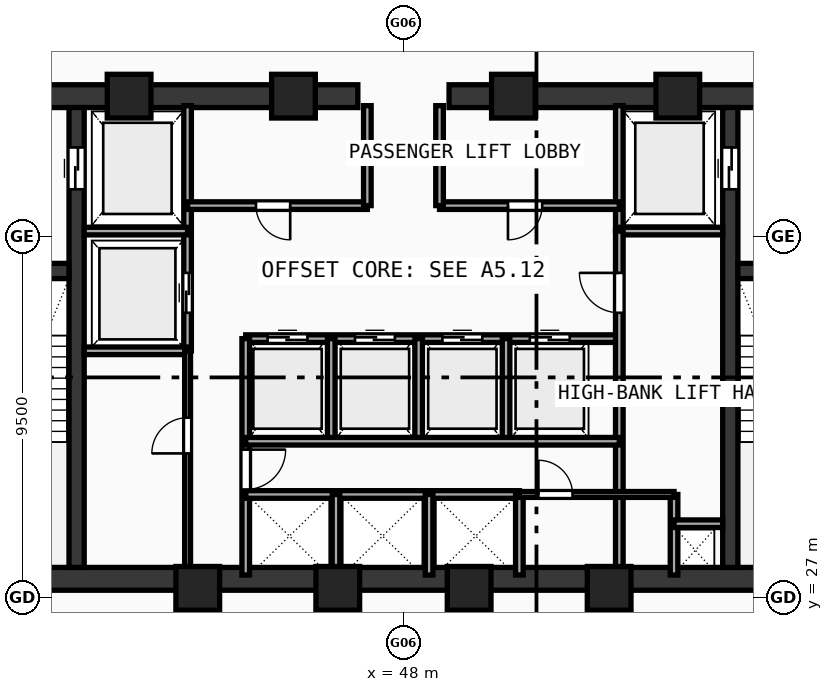
"""IFC4 building model, lengths in metres.
Left out: names, types, materials, properties, quantities, classifications, styles, units other than length and angle.
Written with IfcOpenShell. Run it as: python <this file> out.ifc"""

import sys

from ifc_helpers import new_model, si_unit, direction, frame, frame_2d, origin, origin_with_axes, origin_2d, place, context, subcontext, project, spatial, rectangle, hollow_rectangle, extrude, source, transform, mapped, element, fill, save


model = new_model("IFC4")
c1 = context("Model", 3, precision=1e-05, world=origin(), true_north=direction((0.0, 1.0)))
c2 = subcontext(c1, "Body", "Model", "MODEL_VIEW")
j1 = project(units=[si_unit("LENGTHUNIT", "METRE"), si_unit("PLANEANGLEUNIT", "RADIAN")], contexts=[c1])
p1 = place(None, origin())
s1 = spatial("IfcSite", under=j1, at=p1, CompositionType="ELEMENT")
p2 = place(p1, origin())
s2 = spatial("IfcBuilding", under=s1, at=p2, CompositionType="ELEMENT")
p3 = place(p2, frame((0.0, 0.0, 162.95)))
s3 = spatial("IfcBuildingStorey", under=s2, at=p3, CompositionType="ELEMENT", Elevation=162.95)
p4 = place(p3, frame((35.5, 27.5, 0.0), z_axis=(0.0, 0.0, 1.0), x_axis=(1.0, 0.0, 0.0)))
e1 = element("IfcWall", 1, at=p4, inside=s3, PredefinedType="SHEAR", context=c2, shape_type="SweptSolid", body=[
    extrude(rectangle(XDim=25.0, YDim=0.6, at=frame_2d((12.5, 0.0))), origin(), (0.0, 0.0, 1.0), 3.42),
])
p5 = place(p3, frame((35.5, 40.2, 0.0), z_axis=(0.0, 0.0, 1.0), x_axis=(1.0, 0.0, 0.0)))
e2 = element("IfcWall", 2, at=p5, inside=s3, PredefinedType="SHEAR", context=c2, shape_type="SweptSolid", body=[
    extrude(rectangle(XDim=11.3, YDim=0.6, at=frame_2d((5.65, 0.0))), origin(), (0.0, 0.0, 1.0), 3.42),
])
p6 = place(p5, frame((1.65, 0.0, 0.0)))
e3 = element("IfcOpeningElement", 3, at=p6, cuts=e2, PredefinedType="OPENING", context=c2, shape_type="SweptSolid", body=[
    extrude(rectangle(XDim=1.05, YDim=2.1, at=frame_2d((0.525, 1.05))), frame((0.0, 0.31, 0.0), z_axis=(0.0, -1.0, 0.0), x_axis=(1.0, 0.0, 0.0)), (0.0, 0.0, 1.0), 0.62),
])
p7 = place(p3, frame((49.2, 40.2, 0.0), z_axis=(0.0, 0.0, 1.0), x_axis=(1.0, 0.0, 0.0)))
e4 = element("IfcWall", 4, at=p7, inside=s3, PredefinedType="SHEAR", context=c2, shape_type="SweptSolid", body=[
    extrude(rectangle(XDim=11.3, YDim=0.6, at=frame_2d((5.65, 0.0))), origin(), (0.0, 0.0, 1.0), 3.42),
])
p8 = place(p7, frame((8.6, 0.0, 0.0)))
e5 = element("IfcOpeningElement", 5, at=p8, cuts=e4, PredefinedType="OPENING", context=c2, shape_type="SweptSolid", body=[
    extrude(rectangle(XDim=1.05, YDim=2.1, at=frame_2d((0.525, 1.05))), frame((0.0, 0.31, 0.0), z_axis=(0.0, -1.0, 0.0), x_axis=(1.0, 0.0, 0.0)), (0.0, 0.0, 1.0), 0.62),
])
p9 = place(p3, frame((39.4, 27.8, 0.0), z_axis=(0.0, 0.0, 1.0), x_axis=(0.0, 1.0, 0.0)))
e6 = element("IfcWall", 6, at=p9, inside=s3, PredefinedType="SHEAR", context=c2, shape_type="SweptSolid", body=[
    extrude(rectangle(XDim=12.1, YDim=0.4, at=frame_2d((6.05, 0.0))), origin(), (0.0, 0.0, 1.0), 3.42),
])
p10 = place(p9, frame((9.95, 0.0, 0.0)))
e7 = element("IfcOpeningElement", 7, at=p10, cuts=e6, PredefinedType="OPENING", context=c2, shape_type="SweptSolid", body=[
    extrude(rectangle(XDim=1.1, YDim=2.1, at=frame_2d((0.55, 1.05))), frame((0.0, 0.21, 0.0), z_axis=(0.0, -1.0, 0.0), x_axis=(1.0, 0.0, 0.0)), (0.0, 0.0, 1.0), 0.42),
])
p11 = place(p3, frame((56.6, 27.8, 0.0), z_axis=(0.0, 0.0, 1.0), x_axis=(0.0, 1.0, 0.0)))
e8 = element("IfcWall", 8, at=p11, inside=s3, PredefinedType="SHEAR", context=c2, shape_type="SweptSolid", body=[
    extrude(rectangle(XDim=12.1, YDim=0.4, at=frame_2d((6.05, 0.0))), origin(), (0.0, 0.0, 1.0), 3.42),
])
p12 = place(p11, frame((9.95, 0.0, 0.0)))
e9 = element("IfcOpeningElement", 9, at=p12, cuts=e8, PredefinedType="OPENING", context=c2, shape_type="SweptSolid", body=[
    extrude(rectangle(XDim=1.1, YDim=2.1, at=frame_2d((0.55, 1.05))), frame((0.0, 0.21, 0.0), z_axis=(0.0, -1.0, 0.0), x_axis=(1.0, 0.0, 0.0)), (0.0, 0.0, 1.0), 0.42),
])
p13 = place(p3, frame((36.1, 35.6, 0.0), z_axis=(0.0, 0.0, 1.0), x_axis=(1.0, 0.0, 0.0)))
e10 = element("IfcWall", 10, at=p13, inside=s3, PredefinedType="SHEAR", context=c2, shape_type="SweptSolid", body=[
    extrude(rectangle(XDim=3.1, YDim=0.4, at=frame_2d((1.55, 0.0))), origin(), (0.0, 0.0, 1.0), 3.42),
])
p14 = place(p13, frame((1.02, 0.0, 0.0)))
e11 = element("IfcOpeningElement", 11, at=p14, cuts=e10, PredefinedType="OPENING", context=c2, shape_type="SweptSolid", body=[
    extrude(rectangle(XDim=1.05, YDim=2.1, at=frame_2d((0.525, 1.05))), frame((0.0, 0.21, 0.0), z_axis=(0.0, -1.0, 0.0), x_axis=(1.0, 0.0, 0.0)), (0.0, 0.0, 1.0), 0.42),
])
p15 = place(p3, frame((56.8, 35.6, 0.0), z_axis=(0.0, 0.0, 1.0), x_axis=(1.0, 0.0, 0.0)))
e12 = element("IfcWall", 12, at=p15, inside=s3, PredefinedType="SHEAR", context=c2, shape_type="SweptSolid", body=[
    extrude(rectangle(XDim=3.1, YDim=0.4, at=frame_2d((1.55, 0.0))), origin(), (0.0, 0.0, 1.0), 3.42),
])
p16 = place(p15, frame((1.02, 0.0, 0.0)))
e13 = element("IfcOpeningElement", 13, at=p16, cuts=e12, PredefinedType="OPENING", context=c2, shape_type="SweptSolid", body=[
    extrude(rectangle(XDim=1.05, YDim=2.1, at=frame_2d((0.525, 1.05))), frame((0.0, 0.21, 0.0), z_axis=(0.0, -1.0, 0.0), x_axis=(1.0, 0.0, 0.0)), (0.0, 0.0, 1.0), 0.42),
])
m1 = source(origin(), c2, "Body", "SweptSolid", [
    extrude(hollow_rectangle(XDim=1.15, YDim=1.15, WallThickness=0.048, at=origin_2d()), origin(), (0.0, 0.0, 1.0), 3.68),
])
for number, where, z_axis, x_axis in (
    (14, (42.588, 27.25, -0.26), (0.0, 0.0, 1.0), (1.0, 0.0, 0.0)),
    (15, (46.272, 27.25, -0.26), (0.0, 0.0, 1.0), (1.0, 0.0, 0.0)),
    (16, (49.729, 27.25, -0.26), (0.0, 0.0, 1.0), (1.0, 0.0, 0.0)),
    (17, (53.412, 27.25, -0.26), (0.0, 0.0, 1.0), (1.0, 0.0, 0.0)),
    (18, (55.219, 40.2, -0.26), (0.0, 0.0, 1.0), (1.0, 0.0, 0.0)),
    (19, (50.894, 40.2, -0.26), (0.0, 0.0, 1.0), (1.0, 0.0, 0.0)),
    (20, (45.106, 40.2, -0.26), (0.0, 0.0, 1.0), (1.0, 0.0, 0.0)),
    (21, (40.781, 40.2, -0.26), (0.0, 0.0, 1.0), (1.0, 0.0, 0.0)),
):
    element("IfcColumn", number, at=place(p3, frame(where, z_axis=z_axis, x_axis=x_axis)), inside=s3, PredefinedType="COLUMN", context=c2, shape_type="MappedRepresentation", body=[
        mapped(m1, transform((0.0, 0.0, 0.0), scale=1.0)),
    ])
p17 = place(p3, frame((42.32, 33.5, 0.0), z_axis=(0.0, 0.0, 1.0), x_axis=(0.0, 1.0, 0.0)))
e22 = element("IfcWall", 22, at=p17, inside=s3, PredefinedType="SOLIDWALL", context=c2, shape_type="SweptSolid", body=[
    extrude(rectangle(XDim=6.45, YDim=0.2, at=frame_2d((3.225, 0.0))), origin(), (0.0, 0.0, 1.0), 3.42),
])
p18 = place(p17, frame((1.0, 0.0, 0.0)))
e23 = element("IfcOpeningElement", 23, at=p18, cuts=e22, PredefinedType="OPENING", context=c2, shape_type="SweptSolid", body=[
    extrude(rectangle(XDim=1.05, YDim=2.1, at=frame_2d((0.525, 1.05))), frame((0.0, 0.11, 0.0), z_axis=(0.0, -1.0, 0.0), x_axis=(1.0, 0.0, 0.0)), (0.0, 0.0, 1.0), 0.22),
])
for number, where, z_axis, x_axis in (
    (24, (39.6, 36.65, 0.0), (0.0, 0.0, 1.0), (1.0, 0.0, 0.0)),
    (25, (39.6, 33.5, 0.0), (0.0, 0.0, 1.0), (1.0, 0.0, 0.0)),
):
    element("IfcWall", number, at=place(p3, frame(where, z_axis=z_axis, x_axis=x_axis)), inside=s3, PredefinedType="SOLIDWALL", context=c2, shape_type="SweptSolid", body=[
        extrude(rectangle(XDim=2.72, YDim=0.2, at=frame_2d((1.36, 0.0))), origin(), (0.0, 0.0, 1.0), 3.42),
    ])
p19 = place(p3, frame((53.68, 36.65, 0.0), z_axis=(0.0, 0.0, 1.0), x_axis=(0.0, 1.0, 0.0)))
e26 = element("IfcWall", 26, at=p19, inside=s3, PredefinedType="SOLIDWALL", context=c2, shape_type="SweptSolid", body=[
    extrude(rectangle(XDim=3.3, YDim=0.2, at=frame_2d((1.65, 0.0))), origin(), (0.0, 0.0, 1.0), 3.42),
])
p20 = place(p3, frame((53.68, 36.65, 0.0), z_axis=(0.0, 0.0, 1.0), x_axis=(1.0, 0.0, 0.0)))
e27 = element("IfcWall", 27, at=p20, inside=s3, PredefinedType="SOLIDWALL", context=c2, shape_type="SweptSolid", body=[
    extrude(rectangle(XDim=2.72, YDim=0.2, at=frame_2d((1.36, 0.0))), origin(), (0.0, 0.0, 1.0), 3.42),
])
p21 = place(p3, frame((42.32, 37.32, 0.0), z_axis=(0.0, 0.0, 1.0), x_axis=(1.0, 0.0, 0.0)))
e28 = element("IfcWall", 28, at=p21, inside=s3, PredefinedType="SOLIDWALL", context=c2, shape_type="SweptSolid", body=[
    extrude(rectangle(XDim=4.73, YDim=0.2, at=frame_2d((2.365, 0.0))), origin(), (0.0, 0.0, 1.0), 3.42),
])
p22 = place(p21, frame((1.8, 0.0, 0.0)))
e29 = element("IfcOpeningElement", 29, at=p22, cuts=e28, PredefinedType="OPENING", context=c2, shape_type="SweptSolid", body=[
    extrude(rectangle(XDim=0.9, YDim=2.1, at=frame_2d((0.45, 1.05))), frame((0.0, 0.11, 0.0), z_axis=(0.0, -1.0, 0.0), x_axis=(1.0, 0.0, 0.0)), (0.0, 0.0, 1.0), 0.22),
])
p23 = place(p3, frame((48.95, 37.32, 0.0), z_axis=(0.0, 0.0, 1.0), x_axis=(1.0, 0.0, 0.0)))
e30 = element("IfcWall", 30, at=p23, inside=s3, PredefinedType="SOLIDWALL", context=c2, shape_type="SweptSolid", body=[
    extrude(rectangle(XDim=4.73, YDim=0.2, at=frame_2d((2.365, 0.0))), origin(), (0.0, 0.0, 1.0), 3.42),
])
p24 = place(p23, frame((1.8, 0.0, 0.0)))
e31 = element("IfcOpeningElement", 31, at=p24, cuts=e30, PredefinedType="OPENING", context=c2, shape_type="SweptSolid", body=[
    extrude(rectangle(XDim=0.9, YDim=2.1, at=frame_2d((0.45, 1.05))), frame((0.0, 0.11, 0.0), z_axis=(0.0, -1.0, 0.0), x_axis=(1.0, 0.0, 0.0)), (0.0, 0.0, 1.0), 0.22),
])
for number, where, z_axis, x_axis in (
    (32, (47.05, 37.32, 0.0), (0.0, 0.0, 1.0), (0.0, 1.0, 0.0)),
    (33, (48.95, 37.32, 0.0), (0.0, 0.0, 1.0), (0.0, 1.0, 0.0)),
):
    element("IfcWall", number, at=place(p3, frame(where, z_axis=z_axis, x_axis=x_axis)), inside=s3, PredefinedType="SOLIDWALL", context=c2, shape_type="SweptSolid", body=[
        extrude(rectangle(XDim=2.63, YDim=0.2, at=frame_2d((1.315, 0.0))), origin(), (0.0, 0.0, 1.0), 3.42),
    ])
p25 = place(p3, frame((43.85, 33.82, 0.0), z_axis=(0.0, 0.0, 1.0), x_axis=(1.0, 0.0, 0.0)))
e34 = element("IfcWall", 34, at=p25, inside=s3, PredefinedType="SOLIDWALL", context=c2, shape_type="SweptSolid", body=[
    extrude(rectangle(XDim=9.83, YDim=0.2, at=frame_2d((4.915, 0.0))), origin(), (0.0, 0.0, 1.0), 3.42),
])
p26 = place(p25, frame((0.575, 0.0, 0.0)))
e35 = element("IfcOpeningElement", 35, at=p26, cuts=e34, PredefinedType="OPENING", context=c2, shape_type="SweptSolid", body=[
    extrude(rectangle(XDim=1.05, YDim=2.1, at=frame_2d((0.525, 1.05))), frame((0.0, 0.11, 0.0), z_axis=(0.0, -1.0, 0.0), x_axis=(1.0, 0.0, 0.0)), (0.0, 0.0, 1.0), 0.22),
])
p27 = place(p25, frame((2.875, 0.0, 0.0)))
e36 = element("IfcOpeningElement", 36, at=p27, cuts=e34, PredefinedType="OPENING", context=c2, shape_type="SweptSolid", body=[
    extrude(rectangle(XDim=1.05, YDim=2.1, at=frame_2d((0.525, 1.05))), frame((0.0, 0.11, 0.0), z_axis=(0.0, -1.0, 0.0), x_axis=(1.0, 0.0, 0.0)), (0.0, 0.0, 1.0), 0.22),
])
p28 = place(p25, frame((5.175, 0.0, 0.0)))
e37 = element("IfcOpeningElement", 37, at=p28, cuts=e34, PredefinedType="OPENING", context=c2, shape_type="SweptSolid", body=[
    extrude(rectangle(XDim=1.05, YDim=2.1, at=frame_2d((0.525, 1.05))), frame((0.0, 0.11, 0.0), z_axis=(0.0, -1.0, 0.0), x_axis=(1.0, 0.0, 0.0)), (0.0, 0.0, 1.0), 0.22),
])
p29 = place(p25, frame((7.475, 0.0, 0.0)))
e38 = element("IfcOpeningElement", 38, at=p29, cuts=e34, PredefinedType="OPENING", context=c2, shape_type="SweptSolid", body=[
    extrude(rectangle(XDim=1.05, YDim=2.1, at=frame_2d((0.525, 1.05))), frame((0.0, 0.11, 0.0), z_axis=(0.0, -1.0, 0.0), x_axis=(1.0, 0.0, 0.0)), (0.0, 0.0, 1.0), 0.22),
])
p30 = place(p3, frame((43.85, 27.6, 0.0), z_axis=(0.0, 0.0, 1.0), x_axis=(0.0, 1.0, 0.0)))
e39 = element("IfcWall", 39, at=p30, inside=s3, PredefinedType="SOLIDWALL", context=c2, shape_type="SweptSolid", body=[
    extrude(rectangle(XDim=6.22, YDim=0.2, at=frame_2d((3.11, 0.0))), origin(), (0.0, 0.0, 1.0), 3.42),
])
p31 = place(p30, frame((2.25, 0.0, 0.0)))
e40 = element("IfcOpeningElement", 40, at=p31, cuts=e39, PredefinedType="OPENING", context=c2, shape_type="SweptSolid", body=[
    extrude(rectangle(XDim=1.05, YDim=2.1, at=frame_2d((0.525, 1.05))), frame((0.0, 0.11, 0.0), z_axis=(0.0, -1.0, 0.0), x_axis=(1.0, 0.0, 0.0)), (0.0, 0.0, 1.0), 0.22),
])
p32 = place(p3, frame((53.68, 27.6, 0.0), z_axis=(0.0, 0.0, 1.0), x_axis=(0.0, 1.0, 0.0)))
e41 = element("IfcWall", 41, at=p32, inside=s3, PredefinedType="SOLIDWALL", context=c2, shape_type="SweptSolid", body=[
    extrude(rectangle(XDim=9.05, YDim=0.2, at=frame_2d((4.525, 0.0))), origin(), (0.0, 0.0, 1.0), 3.42),
])
p33 = place(p32, frame((6.9, 0.0, 0.0)))
e42 = element("IfcOpeningElement", 42, at=p33, cuts=e41, PredefinedType="OPENING", context=c2, shape_type="SweptSolid", body=[
    extrude(rectangle(XDim=1.05, YDim=2.1, at=frame_2d((0.525, 1.05))), frame((0.0, 0.11, 0.0), z_axis=(0.0, -1.0, 0.0), x_axis=(1.0, 0.0, 0.0)), (0.0, 0.0, 1.0), 0.22),
])
for number, where, z_axis, x_axis in (
    (43, (46.1, 31.12, 0.0), (0.0, 0.0, 1.0), (0.0, 1.0, 0.0)),
    (44, (48.4, 31.12, 0.0), (0.0, 0.0, 1.0), (0.0, 1.0, 0.0)),
    (45, (50.7, 31.12, 0.0), (0.0, 0.0, 1.0), (0.0, 1.0, 0.0)),
):
    element("IfcWall", number, at=place(p3, frame(where, z_axis=z_axis, x_axis=x_axis)), inside=s3, PredefinedType="SOLIDWALL", context=c2, shape_type="SweptSolid", body=[
        extrude(rectangle(XDim=2.7, YDim=0.2, at=frame_2d((1.35, 0.0))), origin(), (0.0, 0.0, 1.0), 3.42),
    ])
p34 = place(p3, frame((43.85, 29.72, 0.0), z_axis=(0.0, 0.0, 1.0), x_axis=(1.0, 0.0, 0.0)))
e46 = element("IfcWall", 46, at=p34, inside=s3, PredefinedType="SOLIDWALL", context=c2, shape_type="SweptSolid", body=[
    extrude(rectangle(XDim=7.2, YDim=0.2, at=frame_2d((3.6, 0.0))), origin(), (0.0, 0.0, 1.0), 3.42),
])
p35 = place(p3, frame((51.05, 27.6, 0.0), z_axis=(0.0, 0.0, 1.0), x_axis=(0.0, 1.0, 0.0)))
e47 = element("IfcWall", 47, at=p35, inside=s3, PredefinedType="SOLIDWALL", context=c2, shape_type="SweptSolid", body=[
    extrude(rectangle(XDim=2.12, YDim=0.2, at=frame_2d((1.06, 0.0))), origin(), (0.0, 0.0, 1.0), 3.42),
])
p36 = place(p3, frame((43.85, 31.12, 0.0), z_axis=(0.0, 0.0, 1.0), x_axis=(1.0, 0.0, 0.0)))
e48 = element("IfcWall", 48, at=p36, inside=s3, PredefinedType="SOLIDWALL", context=c2, shape_type="SweptSolid", body=[
    extrude(rectangle(XDim=9.83, YDim=0.2, at=frame_2d((4.915, 0.0))), origin(), (0.0, 0.0, 1.0), 3.42),
])
for number, where, z_axis, x_axis in (
    (49, (46.225, 27.6, 0.0), (0.0, 0.0, 1.0), (0.0, 1.0, 0.0)),
    (50, (48.675, 27.6, 0.0), (0.0, 0.0, 1.0), (0.0, 1.0, 0.0)),
    (51, (55.12, 27.6, 0.0), (0.0, 0.0, 1.0), (0.0, 1.0, 0.0)),
):
    element("IfcWall", number, at=place(p3, frame(where, z_axis=z_axis, x_axis=x_axis)), inside=s3, PredefinedType="SOLIDWALL", context=c2, shape_type="SweptSolid", body=[
        extrude(rectangle(XDim=2.12, YDim=0.2, at=frame_2d((1.06, 0.0))), origin(), (0.0, 0.0, 1.0), 3.42),
    ])
p37 = place(p3, frame((55.12, 28.95, 0.0), z_axis=(0.0, 0.0, 1.0), x_axis=(1.0, 0.0, 0.0)))
e52 = element("IfcWall", 52, at=p37, inside=s3, PredefinedType="SOLIDWALL", context=c2, shape_type="SweptSolid", body=[
    extrude(rectangle(XDim=1.28, YDim=0.2, at=frame_2d((0.64, 0.0))), origin(), (0.0, 0.0, 1.0), 3.42),
])
p38 = place(p3, frame((42.32, 27.6, 0.0), z_axis=(0.0, 0.0, 1.0), x_axis=(0.0, 1.0, 0.0)))
e53 = element("IfcWall", 53, at=p38, inside=s3, PredefinedType="PARTITIONING", context=c2, shape_type="SweptSolid", body=[
    extrude(rectangle(XDim=5.9, YDim=0.155, at=frame_2d((2.95, 0.0))), origin(), (0.0, 0.0, 1.0), 3.42),
])
p39 = place(p38, frame((3.2, 0.0, 0.0)))
e54 = element("IfcOpeningElement", 54, at=p39, cuts=e53, PredefinedType="OPENING", context=c2, shape_type="SweptSolid", body=[
    extrude(rectangle(XDim=0.94, YDim=2.1, at=frame_2d((0.47, 1.05))), frame((0.0, 0.087, 0.0), z_axis=(0.0, -1.0, 0.0), x_axis=(1.0, 0.0, 0.0)), (0.0, 0.0, 1.0), 0.175),
])
p40 = place(p3, frame((51.05, 29.72, 0.0), z_axis=(0.0, 0.0, 1.0), x_axis=(1.0, 0.0, 0.0)))
e55 = element("IfcWall", 55, at=p40, inside=s3, PredefinedType="PARTITIONING", context=c2, shape_type="SweptSolid", body=[
    extrude(rectangle(XDim=4.07, YDim=0.155, at=frame_2d((2.035, 0.0))), origin(), (0.0, 0.0, 1.0), 3.42),
])
p41 = place(p40, frame((0.5, 0.0, 0.0)))
e56 = element("IfcOpeningElement", 56, at=p41, cuts=e55, PredefinedType="OPENING", context=c2, shape_type="SweptSolid", body=[
    extrude(rectangle(XDim=0.9, YDim=2.1, at=frame_2d((0.45, 1.05))), frame((0.0, 0.087, 0.0), z_axis=(0.0, -1.0, 0.0), x_axis=(1.0, 0.0, 0.0)), (0.0, 0.0, 1.0), 0.175),
])
m2 = source(origin(), c2, "Body", "SweptSolid", [
    extrude(rectangle(XDim=1.1, YDim=2.1, at=frame_2d((0.55, 1.05))), frame((0.0, 0.025, 0.0), z_axis=(0.0, -1.0, 0.0), x_axis=(1.0, 0.0, 0.0)), (0.0, 0.0, 1.0), 0.05),
])
p42 = place(p10, frame((1.1, 0.0, 0.0), z_axis=(0.0, 0.0, 1.0), x_axis=(-1.0, 0.0, 0.0)))
e57 = element("IfcDoor", 57, at=p42, inside=s3, OperationType="DOUBLE_DOOR_SLIDING", PredefinedType="DOOR", context=c2, shape_type="MappedRepresentation", body=[
    mapped(m2, transform((0.0, 0.0, 0.0), scale=1.0)),
])
fill(e7, e57)
p43 = place(p12, origin_with_axes())
e58 = element("IfcDoor", 58, at=p43, inside=s3, OperationType="DOUBLE_DOOR_SLIDING", PredefinedType="DOOR", context=c2, shape_type="MappedRepresentation", body=[
    mapped(m2, transform((0.0, 0.0, 0.0), scale=1.0)),
])
fill(e9, e58)
m3 = source(origin(), c2, "Body", "SweptSolid", [
    extrude(rectangle(XDim=1.05, YDim=2.1, at=frame_2d((0.525, 1.05))), frame((0.0, 0.025, 0.0), z_axis=(0.0, -1.0, 0.0), x_axis=(1.0, 0.0, 0.0)), (0.0, 0.0, 1.0), 0.05),
])
p44 = place(p18, origin_with_axes())
e59 = element("IfcDoor", 59, at=p44, inside=s3, OperationType="DOUBLE_DOOR_SLIDING", PredefinedType="DOOR", context=c2, shape_type="MappedRepresentation", body=[
    mapped(m3, transform((0.0, 0.0, 0.0), scale=1.0)),
])
fill(e23, e59)
m4 = source(origin(), c2, "Body", "SweptSolid", [
    extrude(rectangle(XDim=0.9, YDim=2.1, at=frame_2d((0.45, 1.05))), frame((0.0, 0.025, 0.0), z_axis=(0.0, -1.0, 0.0), x_axis=(1.0, 0.0, 0.0)), (0.0, 0.0, 1.0), 0.05),
])
p45 = place(p22, frame((0.9, 0.0, 0.0), z_axis=(0.0, 0.0, 1.0), x_axis=(-1.0, 0.0, 0.0)))
e60 = element("IfcDoor", 60, at=p45, inside=s3, OperationType="SINGLE_SWING_LEFT", PredefinedType="DOOR", context=c2, shape_type="MappedRepresentation", body=[
    mapped(m4, transform((0.0, 0.0, 0.0), scale=1.0)),
])
fill(e29, e60)
p46 = place(p24, frame((0.9, 0.0, 0.0), z_axis=(0.0, 0.0, 1.0), x_axis=(-1.0, 0.0, 0.0)))
e61 = element("IfcDoor", 61, at=p46, inside=s3, OperationType="SINGLE_SWING_RIGHT", PredefinedType="DOOR", context=c2, shape_type="MappedRepresentation", body=[
    mapped(m4, transform((0.0, 0.0, 0.0), scale=1.0)),
])
fill(e31, e61)
p47 = place(p26, origin_with_axes())
e62 = element("IfcDoor", 62, at=p47, inside=s3, OperationType="DOUBLE_DOOR_SLIDING", PredefinedType="DOOR", context=c2, shape_type="MappedRepresentation", body=[
    mapped(m3, transform((0.0, 0.0, 0.0), scale=1.0)),
])
fill(e35, e62)
p48 = place(p27, origin_with_axes())
e63 = element("IfcDoor", 63, at=p48, inside=s3, OperationType="DOUBLE_DOOR_SLIDING", PredefinedType="DOOR", context=c2, shape_type="MappedRepresentation", body=[
    mapped(m3, transform((0.0, 0.0, 0.0), scale=1.0)),
])
fill(e36, e63)
p49 = place(p28, origin_with_axes())
e64 = element("IfcDoor", 64, at=p49, inside=s3, OperationType="DOUBLE_DOOR_SLIDING", PredefinedType="DOOR", context=c2, shape_type="MappedRepresentation", body=[
    mapped(m3, transform((0.0, 0.0, 0.0), scale=1.0)),
])
fill(e37, e64)
p50 = place(p29, origin_with_axes())
e65 = element("IfcDoor", 65, at=p50, inside=s3, OperationType="DOUBLE_DOOR_SLIDING", PredefinedType="DOOR", context=c2, shape_type="MappedRepresentation", body=[
    mapped(m3, transform((0.0, 0.0, 0.0), scale=1.0)),
])
fill(e38, e65)
p51 = place(p31, frame((1.05, 0.0, 0.0), z_axis=(0.0, 0.0, 1.0), x_axis=(-1.0, 0.0, 0.0)))
e66 = element("IfcDoor", 66, at=p51, inside=s3, OperationType="SINGLE_SWING_LEFT", PredefinedType="DOOR", context=c2, shape_type="MappedRepresentation", body=[
    mapped(m3, transform((0.0, 0.0, 0.0), scale=1.0)),
])
fill(e40, e66)
p52 = place(p33, origin_with_axes())
e67 = element("IfcDoor", 67, at=p52, inside=s3, OperationType="SINGLE_SWING_RIGHT", PredefinedType="DOOR", context=c2, shape_type="MappedRepresentation", body=[
    mapped(m3, transform((0.0, 0.0, 0.0), scale=1.0)),
])
fill(e42, e67)
m5 = source(origin(), c2, "Body", "SweptSolid", [
    extrude(rectangle(XDim=0.94, YDim=2.1, at=frame_2d((0.47, 1.05))), frame((0.0, 0.025, 0.0), z_axis=(0.0, -1.0, 0.0), x_axis=(1.0, 0.0, 0.0)), (0.0, 0.0, 1.0), 0.05),
])
p53 = place(p39, origin_with_axes())
e68 = element("IfcDoor", 68, at=p53, inside=s3, OperationType="SINGLE_SWING_LEFT", PredefinedType="DOOR", context=c2, shape_type="MappedRepresentation", body=[
    mapped(m5, transform((0.0, 0.0, 0.0), scale=1.0)),
])
fill(e54, e68)
p54 = place(p41, origin_with_axes())
e69 = element("IfcDoor", 69, at=p54, inside=s3, OperationType="SINGLE_SWING_LEFT", PredefinedType="DOOR", context=c2, shape_type="MappedRepresentation", body=[
    mapped(m4, transform((0.0, 0.0, 0.0), scale=1.0)),
])
fill(e56, e69)
save(model, sys.argv[1])
